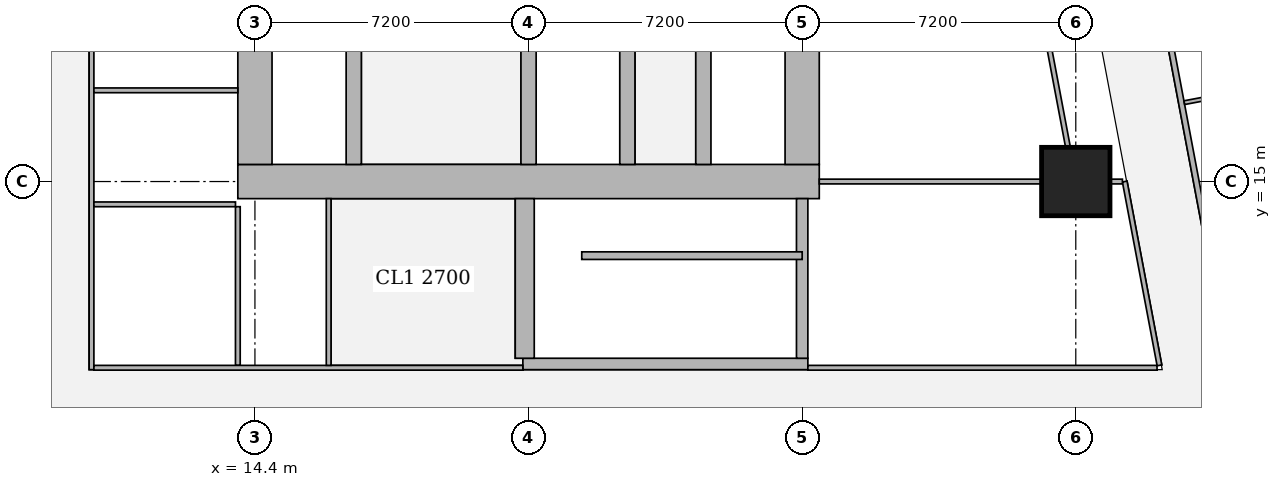
"""IFC4 building model, lengths in metres.
Left out: names, types, materials, properties, quantities, classifications, styles, units other than length and angle.
Written with IfcOpenShell. Run it as: python <this file> out.ifc"""

import sys

from ifc_helpers import new_model, si_unit, direction, frame, frame_2d, origin, origin_2d, place, context, subcontext, project, spatial, rectangle, extrude, element, fill, save


model = new_model("IFC4")
c1 = context("Model", 3, precision=1e-05, world=origin(), true_north=direction((0.0, 1.0)))
c2 = subcontext(c1, "Body", "Model", "MODEL_VIEW")
j1 = project(units=[si_unit("LENGTHUNIT", "METRE"), si_unit("PLANEANGLEUNIT", "RADIAN")], contexts=[c1])
p1 = place(None, origin())
s1 = spatial("IfcSite", under=j1, at=p1, CompositionType="ELEMENT")
p2 = place(p1, origin())
s2 = spatial("IfcBuilding", under=s1, at=p2, CompositionType="ELEMENT")
p3 = place(p2, frame((0.0, 0.0, 53.75)))
s3 = spatial("IfcBuildingStorey", under=s2, at=p3, CompositionType="ELEMENT", Elevation=53.75)
p4 = place(p3, frame((36.0, 15.0, 0.0), z_axis=(0.0, 0.0, 1.0), x_axis=(1.0, 0.0, 0.0)))
e1 = element("IfcColumn", 1, at=p4, inside=s3, PredefinedType="COLUMN", context=c2, shape_type="SweptSolid", body=[
    extrude(rectangle(XDim=1.8, YDim=1.8, at=origin_2d()), origin(), (0.0, 0.0, 1.0), 3.75),
])
p5 = place(p3, frame((13.95, 15.0, 0.0), z_axis=(0.0, 0.0, 1.0), x_axis=(1.0, 0.0, 0.0)))
e2 = element("IfcWall", 2, at=p5, inside=s3, PredefinedType="SHEAR", context=c2, shape_type="SweptSolid", body=[
    extrude(rectangle(XDim=15.3, YDim=0.9, at=frame_2d((7.65, 0.0))), origin(), (0.0, 0.0, 1.0), 3.75),
])
p6 = place(p5, frame((4.45, 0.0, 0.0)))
e3 = element("IfcOpeningElement", 3, at=p6, cuts=e2, PredefinedType="OPENING", context=c2, shape_type="SweptSolid", body=[
    extrude(rectangle(XDim=1.8, YDim=2.1, at=frame_2d((0.9, 1.05))), frame((0.0, 0.46, 0.0), z_axis=(0.0, -1.0, 0.0), x_axis=(1.0, 0.0, 0.0)), (0.0, 0.0, 1.0), 0.92),
])
p7 = place(p5, frame((10.7, 0.0, 0.0)))
e4 = element("IfcOpeningElement", 4, at=p7, cuts=e2, PredefinedType="OPENING", context=c2, shape_type="SweptSolid", body=[
    extrude(rectangle(XDim=1.1, YDim=2.1, at=frame_2d((0.55, 1.05))), frame((0.0, 0.46, 0.0), z_axis=(0.0, -1.0, 0.0), x_axis=(1.0, 0.0, 0.0)), (0.0, 0.0, 1.0), 0.92),
])
for number, where, z_axis, x_axis in (
    (5, (14.4, 15.45, 0.0), (0.0, 0.0, 1.0), (0.0, 1.0, 0.0)),
    (6, (28.8, 15.45, 0.0), (0.0, 0.0, 1.0), (0.0, 1.0, 0.0)),
):
    element("IfcWall", number, at=place(p3, frame(where, z_axis=z_axis, x_axis=x_axis)), inside=s3, PredefinedType="SHEAR", context=c2, shape_type="SweptSolid", body=[
        extrude(rectangle(XDim=14.1, YDim=0.9, at=frame_2d((7.05, 0.0))), origin(), (0.0, 0.0, 1.0), 3.75),
    ])
p8 = place(p3, frame((17.0, 15.45, 0.0), z_axis=(0.0, 0.0, 1.0), x_axis=(0.0, 1.0, 0.0)))
e7 = element("IfcWall", 7, at=p8, inside=s3, PredefinedType="SHEAR", context=c2, shape_type="SweptSolid", body=[
    extrude(rectangle(XDim=14.1, YDim=0.4, at=frame_2d((7.05, 0.0))), origin(), (0.0, 0.0, 1.0), 3.75),
])
p9 = place(p8, frame((0.875, 0.0, 0.0)))
e8 = element("IfcOpeningElement", 8, at=p9, cuts=e7, PredefinedType="OPENING", context=c2, shape_type="SweptSolid", body=[
    extrude(rectangle(XDim=1.1, YDim=2.1, at=frame_2d((0.55, 1.05))), frame((0.0, 0.21, 0.0), z_axis=(0.0, -1.0, 0.0), x_axis=(1.0, 0.0, 0.0)), (0.0, 0.0, 1.0), 0.42),
])
p10 = place(p8, frame((4.625, 0.0, 0.0)))
e9 = element("IfcOpeningElement", 9, at=p10, cuts=e7, PredefinedType="OPENING", context=c2, shape_type="SweptSolid", body=[
    extrude(rectangle(XDim=1.1, YDim=2.1, at=frame_2d((0.55, 1.05))), frame((0.0, 0.21, 0.0), z_axis=(0.0, -1.0, 0.0), x_axis=(1.0, 0.0, 0.0)), (0.0, 0.0, 1.0), 0.42),
])
p11 = place(p8, frame((8.375, 0.0, 0.0)))
e10 = element("IfcOpeningElement", 10, at=p11, cuts=e7, PredefinedType="OPENING", context=c2, shape_type="SweptSolid", body=[
    extrude(rectangle(XDim=1.1, YDim=2.1, at=frame_2d((0.55, 1.05))), frame((0.0, 0.21, 0.0), z_axis=(0.0, -1.0, 0.0), x_axis=(1.0, 0.0, 0.0)), (0.0, 0.0, 1.0), 0.42),
])
p12 = place(p8, frame((12.125, 0.0, 0.0)))
e11 = element("IfcOpeningElement", 11, at=p12, cuts=e7, PredefinedType="OPENING", context=c2, shape_type="SweptSolid", body=[
    extrude(rectangle(XDim=1.1, YDim=2.1, at=frame_2d((0.55, 1.05))), frame((0.0, 0.21, 0.0), z_axis=(0.0, -1.0, 0.0), x_axis=(1.0, 0.0, 0.0)), (0.0, 0.0, 1.0), 0.42),
])
for number, where, z_axis, x_axis in (
    (12, (21.6, 15.45, 0.0), (0.0, 0.0, 1.0), (0.0, 1.0, 0.0)),
    (13, (24.2, 15.45, 0.0), (0.0, 0.0, 1.0), (0.0, 1.0, 0.0)),
):
    element("IfcWall", number, at=place(p3, frame(where, z_axis=z_axis, x_axis=x_axis)), inside=s3, PredefinedType="SHEAR", context=c2, shape_type="SweptSolid", body=[
        extrude(rectangle(XDim=14.1, YDim=0.4, at=frame_2d((7.05, 0.0))), origin(), (0.0, 0.0, 1.0), 3.75),
    ])
p13 = place(p3, frame((26.2, 15.45, 0.0), z_axis=(0.0, 0.0, 1.0), x_axis=(0.0, 1.0, 0.0)))
e14 = element("IfcWall", 14, at=p13, inside=s3, PredefinedType="SHEAR", context=c2, shape_type="SweptSolid", body=[
    extrude(rectangle(XDim=3.1, YDim=0.4, at=frame_2d((1.55, 0.0))), origin(), (0.0, 0.0, 1.0), 3.75),
])
p14 = place(p13, frame((0.825, 0.0, 0.0)))
e15 = element("IfcOpeningElement", 15, at=p14, cuts=e14, PredefinedType="OPENING", context=c2, shape_type="SweptSolid", body=[
    extrude(rectangle(XDim=1.2, YDim=2.1, at=frame_2d((0.6, 1.05))), frame((0.0, 0.21, 0.0), z_axis=(0.0, -1.0, 0.0), x_axis=(1.0, 0.0, 0.0)), (0.0, 0.0, 1.0), 0.42),
])
p15 = place(p3, frame((21.45, 10.2, 0.0), z_axis=(0.0, 0.0, 1.0), x_axis=(1.0, 0.0, 0.0)))
e16 = element("IfcWall", 16, at=p15, inside=s3, PredefinedType="SHEAR", context=c2, shape_type="SweptSolid", body=[
    extrude(rectangle(XDim=7.5, YDim=0.3, at=frame_2d((3.75, 0.0))), origin(), (0.0, 0.0, 1.0), 3.75),
])
p16 = place(p15, frame((0.5, 0.0, 0.0)))
e17 = element("IfcOpeningElement", 17, at=p16, cuts=e16, PredefinedType="OPENING", context=c2, shape_type="SweptSolid", body=[
    extrude(rectangle(XDim=1.1, YDim=2.1, at=frame_2d((0.55, 1.05))), frame((0.0, 0.16, 0.0), z_axis=(0.0, -1.0, 0.0), x_axis=(1.0, 0.0, 0.0)), (0.0, 0.0, 1.0), 0.32),
])
p17 = place(p3, frame((21.5, 10.35, 0.0), z_axis=(0.0, 0.0, 1.0), x_axis=(0.0, 1.0, 0.0)))
e18 = element("IfcWall", 18, at=p17, inside=s3, PredefinedType="SHEAR", context=c2, shape_type="SweptSolid", body=[
    extrude(rectangle(XDim=4.2, YDim=0.5, at=frame_2d((2.1, 0.0))), origin(), (0.0, 0.0, 1.0), 3.75),
])
p18 = place(p3, frame((28.8, 10.35, 0.0), z_axis=(0.0, 0.0, 1.0), x_axis=(0.0, 1.0, 0.0)))
e19 = element("IfcWall", 19, at=p18, inside=s3, PredefinedType="SHEAR", context=c2, shape_type="SweptSolid", body=[
    extrude(rectangle(XDim=4.2, YDim=0.3, at=frame_2d((2.1, 0.0))), origin(), (0.0, 0.0, 1.0), 3.75),
])
p19 = place(p3, frame((35.094, 36.585, 0.0), z_axis=(0.0, 0.0, 1.0), x_axis=(0.185588860311, -0.982627485331, 0.0)))
e20 = element("IfcWall", 20, at=p19, inside=s3, PredefinedType="SOLIDWALL", context=c2, shape_type="SweptSolid", body=[
    extrude(rectangle(XDim=34.797, YDim=0.15, at=frame_2d((17.399, 0.0))), origin(), (0.0, 0.0, 1.0), 2.5),
])
p20 = place(p19, frame((9.828, 0.0, 0.0)))
e21 = element("IfcOpeningElement", 21, at=p20, cuts=e20, PredefinedType="OPENING", context=c2, shape_type="SweptSolid", body=[
    extrude(rectangle(XDim=1.0, YDim=2.1, at=frame_2d((0.5, 1.05))), frame((0.0, 0.085, 0.0), z_axis=(0.0, -1.0, 0.0), x_axis=(1.0, 0.0, 0.0)), (0.0, 0.0, 1.0), 0.17),
])
p21 = place(p19, frame((13.645, 0.0, 0.0)))
e22 = element("IfcOpeningElement", 22, at=p21, cuts=e20, PredefinedType="OPENING", context=c2, shape_type="SweptSolid", body=[
    extrude(rectangle(XDim=1.0, YDim=2.1, at=frame_2d((0.5, 1.05))), frame((0.0, 0.085, 0.0), z_axis=(0.0, -1.0, 0.0), x_axis=(1.0, 0.0, 0.0)), (0.0, 0.0, 1.0), 0.17),
])
p22 = place(p19, frame((25.9, 0.0, 0.0)))
e23 = element("IfcOpeningElement", 23, at=p22, cuts=e20, PredefinedType="OPENING", context=c2, shape_type="SweptSolid", body=[
    extrude(rectangle(XDim=1.0, YDim=2.1, at=frame_2d((0.5, 1.05))), frame((0.0, 0.085, 0.0), z_axis=(0.0, -1.0, 0.0), x_axis=(1.0, 0.0, 0.0)), (0.0, 0.0, 1.0), 0.17),
])
p23 = place(p3, frame((42.073, 17.683, 0.0), z_axis=(0.0, 0.0, 1.0), x_axis=(-0.982607026909, -0.185697147715, 0.0)))
e24 = element("IfcWall", 24, at=p23, inside=s3, PredefinedType="PARTITIONING", context=c2, shape_type="SweptSolid", body=[
    extrude(rectangle(XDim=3.275, YDim=0.1, at=frame_2d((1.637, 0.0))), origin(), (0.0, 0.0, 1.0), 3.5),
])
p24 = place(p3, frame((10.1, 10.05, 0.0), z_axis=(0.0, 0.0, 1.0), x_axis=(0.0, 1.0, 0.0)))
e25 = element("IfcWall", 25, at=p24, inside=s3, PredefinedType="PARTITIONING", context=c2, shape_type="SweptSolid", body=[
    extrude(rectangle(XDim=24.9, YDim=0.125, at=frame_2d((12.45, 0.0))), origin(), (0.0, 0.0, 1.0), 3.5),
])
p25 = place(p24, frame((1.675, 0.0, 0.0)))
e26 = element("IfcOpeningElement", 26, at=p25, cuts=e25, PredefinedType="OPENING", context=c2, shape_type="SweptSolid", body=[
    extrude(rectangle(XDim=1.0, YDim=2.1, at=frame_2d((0.5, 1.05))), frame((0.0, 0.073, 0.0), z_axis=(0.0, -1.0, 0.0), x_axis=(1.0, 0.0, 0.0)), (0.0, 0.0, 1.0), 0.145),
])
p26 = place(p24, frame((5.35, 0.0, 0.0)))
e27 = element("IfcOpeningElement", 27, at=p26, cuts=e25, PredefinedType="OPENING", context=c2, shape_type="SweptSolid", body=[
    extrude(rectangle(XDim=1.0, YDim=2.1, at=frame_2d((0.5, 1.05))), frame((0.0, 0.073, 0.0), z_axis=(0.0, -1.0, 0.0), x_axis=(1.0, 0.0, 0.0)), (0.0, 0.0, 1.0), 0.145),
])
p27 = place(p24, frame((11.05, 0.0, 0.0)))
e28 = element("IfcOpeningElement", 28, at=p27, cuts=e25, PredefinedType="OPENING", context=c2, shape_type="SweptSolid", body=[
    extrude(rectangle(XDim=1.0, YDim=2.1, at=frame_2d((0.5, 1.05))), frame((0.0, 0.073, 0.0), z_axis=(0.0, -1.0, 0.0), x_axis=(1.0, 0.0, 0.0)), (0.0, 0.0, 1.0), 0.145),
])
p28 = place(p24, frame((18.35, 0.0, 0.0)))
e29 = element("IfcOpeningElement", 29, at=p28, cuts=e25, PredefinedType="OPENING", context=c2, shape_type="SweptSolid", body=[
    extrude(rectangle(XDim=1.0, YDim=2.1, at=frame_2d((0.5, 1.05))), frame((0.0, 0.073, 0.0), z_axis=(0.0, -1.0, 0.0), x_axis=(1.0, 0.0, 0.0)), (0.0, 0.0, 1.0), 0.145),
])
p29 = place(p24, frame((22.925, 0.0, 0.0)))
e30 = element("IfcOpeningElement", 30, at=p29, cuts=e25, PredefinedType="OPENING", context=c2, shape_type="SweptSolid", body=[
    extrude(rectangle(XDim=1.0, YDim=2.1, at=frame_2d((0.5, 1.05))), frame((0.0, 0.073, 0.0), z_axis=(0.0, -1.0, 0.0), x_axis=(1.0, 0.0, 0.0)), (0.0, 0.0, 1.0), 0.145),
])
p30 = place(p3, frame((10.163, 14.4, 0.0), z_axis=(0.0, 0.0, 1.0), x_axis=(1.0, 0.0, 0.0)))
e31 = element("IfcWall", 31, at=p30, inside=s3, PredefinedType="PARTITIONING", context=c2, shape_type="SweptSolid", body=[
    extrude(rectangle(XDim=3.725, YDim=0.125, at=frame_2d((1.862, 0.0))), origin(), (0.0, 0.0, 1.0), 3.5),
])
p31 = place(p3, frame((10.163, 17.4, 0.0), z_axis=(0.0, 0.0, 1.0), x_axis=(1.0, 0.0, 0.0)))
e32 = element("IfcWall", 32, at=p31, inside=s3, PredefinedType="PARTITIONING", context=c2, shape_type="SweptSolid", body=[
    extrude(rectangle(XDim=3.787, YDim=0.125, at=frame_2d((1.894, 0.0))), origin(), (0.0, 0.0, 1.0), 3.5),
])
p32 = place(p3, frame((13.95, 10.163, 0.0), z_axis=(0.0, 0.0, 1.0), x_axis=(0.0, 1.0, 0.0)))
e33 = element("IfcWall", 33, at=p32, inside=s3, PredefinedType="PARTITIONING", context=c2, shape_type="SweptSolid", body=[
    extrude(rectangle(XDim=4.175, YDim=0.125, at=frame_2d((2.087, 0.0))), origin(), (0.0, 0.0, 1.0), 3.5),
])
p33 = place(p3, frame((10.163, 10.1, 0.0), z_axis=(0.0, 0.0, 1.0), x_axis=(1.0, 0.0, 0.0)))
e34 = element("IfcWall", 34, at=p33, inside=s3, PredefinedType="PARTITIONING", context=c2, shape_type="SweptSolid", body=[
    extrude(rectangle(XDim=11.287, YDim=0.125, at=frame_2d((5.644, 0.0))), origin(), (0.0, 0.0, 1.0), 3.5),
])
p34 = place(p33, frame((7.832, 0.0, 0.0)))
e35 = element("IfcOpeningElement", 35, at=p34, cuts=e34, PredefinedType="OPENING", context=c2, shape_type="SweptSolid", body=[
    extrude(rectangle(XDim=1.8, YDim=2.1, at=frame_2d((0.9, 1.05))), frame((0.0, 0.073, 0.0), z_axis=(0.0, -1.0, 0.0), x_axis=(1.0, 0.0, 0.0)), (0.0, 0.0, 1.0), 0.145),
])
p35 = place(p3, frame((16.34, 10.163, 0.0), z_axis=(0.0, 0.0, 1.0), x_axis=(0.0, 1.0, 0.0)))
e36 = element("IfcWall", 36, at=p35, inside=s3, PredefinedType="PARTITIONING", context=c2, shape_type="SweptSolid", body=[
    extrude(rectangle(XDim=4.387, YDim=0.125, at=frame_2d((2.193, 0.0))), origin(), (0.0, 0.0, 1.0), 3.5),
])
p36 = place(p35, frame((1.637, 0.0, 0.0)))
e37 = element("IfcOpeningElement", 37, at=p36, cuts=e36, PredefinedType="OPENING", context=c2, shape_type="SweptSolid", body=[
    extrude(rectangle(XDim=1.0, YDim=2.1, at=frame_2d((0.5, 1.05))), frame((0.0, 0.073, 0.0), z_axis=(0.0, -1.0, 0.0), x_axis=(1.0, 0.0, 0.0)), (0.0, 0.0, 1.0), 0.145),
])
p37 = place(p3, frame((28.95, 10.1, 0.0), z_axis=(0.0, 0.0, 1.0), x_axis=(1.0, 0.0, 0.0)))
e38 = element("IfcWall", 38, at=p37, inside=s3, PredefinedType="PARTITIONING", context=c2, shape_type="SweptSolid", body=[
    extrude(rectangle(XDim=9.188, YDim=0.125, at=frame_2d((4.594, 0.0))), origin(), (0.0, 0.0, 1.0), 3.5),
])
p38 = place(p3, frame((38.202, 10.163, 0.0), z_axis=(0.0, 0.0, 1.0), x_axis=(-0.185641892853, 0.982617467593, 0.0)))
e39 = element("IfcWall", 39, at=p38, inside=s3, PredefinedType="PARTITIONING", context=c2, shape_type="SweptSolid", body=[
    extrude(rectangle(XDim=4.922, YDim=0.125, at=frame_2d((2.461, 0.0))), origin(), (0.0, 0.0, 1.0), 3.5),
])
p39 = place(p38, frame((0.708, 0.0, 0.0)))
e40 = element("IfcOpeningElement", 40, at=p39, cuts=e39, PredefinedType="OPENING", context=c2, shape_type="SweptSolid", body=[
    extrude(rectangle(XDim=1.0, YDim=2.1, at=frame_2d((0.5, 1.05))), frame((0.0, 0.073, 0.0), z_axis=(0.0, -1.0, 0.0), x_axis=(1.0, 0.0, 0.0)), (0.0, 0.0, 1.0), 0.145),
])
p40 = place(p3, frame((35.793, 15.913, 0.0), z_axis=(0.0, 0.0, 1.0), x_axis=(-0.185651708232, 0.982615613162, 0.0)))
e41 = element("IfcWall", 41, at=p40, inside=s3, PredefinedType="PARTITIONING", context=c2, shape_type="SweptSolid", body=[
    extrude(rectangle(XDim=13.407, YDim=0.125, at=frame_2d((6.704, 0.0))), origin(), (0.0, 0.0, 1.0), 2.5),
])
p41 = place(p40, frame((4.9, 0.0, 0.0)))
e42 = element("IfcOpeningElement", 42, at=p41, cuts=e41, PredefinedType="OPENING", context=c2, shape_type="SweptSolid", body=[
    extrude(rectangle(XDim=1.0, YDim=2.1, at=frame_2d((0.5, 1.05))), frame((0.0, 0.073, 0.0), z_axis=(0.0, -1.0, 0.0), x_axis=(1.0, 0.0, 0.0)), (0.0, 0.0, 1.0), 0.145),
])
p42 = place(p3, frame((29.25, 15.0, 0.0), z_axis=(0.0, 0.0, 1.0), x_axis=(1.0, 0.0, 0.0)))
e43 = element("IfcWall", 43, at=p42, inside=s3, PredefinedType="PARTITIONING", context=c2, shape_type="SweptSolid", body=[
    extrude(rectangle(XDim=5.849, YDim=0.125, at=frame_2d((2.925, 0.0))), origin(), (0.0, 0.0, 1.0), 3.5),
])
p43 = place(p3, frame((36.901, 15.0, 0.0), z_axis=(0.0, 0.0, 1.0), x_axis=(1.0, 0.0, 0.0)))
e44 = element("IfcWall", 44, at=p43, inside=s3, PredefinedType="PARTITIONING", context=c2, shape_type="SweptSolid", body=[
    extrude(rectangle(XDim=0.326, YDim=0.125, at=frame_2d((0.163, 0.0))), origin(), (0.0, 0.0, 1.0), 3.5),
])
p44 = place(p3, frame((23.0, 13.05, 0.0), z_axis=(0.0, 0.0, 1.0), x_axis=(1.0, 0.0, 0.0)))
e45 = element("IfcWall", 45, at=p44, inside=s3, PredefinedType="SHEAR", context=c2, shape_type="SweptSolid", body=[
    extrude(rectangle(XDim=5.8, YDim=0.2, at=frame_2d((2.9, 0.0))), origin(), (0.0, 0.0, 1.0), 3.75),
])
p45 = place(p25, origin())
e46 = element("IfcDoor", 46, at=p45, inside=s3, OperationType="SINGLE_SWING_RIGHT", PredefinedType="DOOR", context=c2, shape_type="SweptSolid", body=[
    extrude(rectangle(XDim=1.0, YDim=2.1, at=frame_2d((0.5, 1.05))), frame((0.0, 0.025, 0.0), z_axis=(0.0, -1.0, 0.0), x_axis=(1.0, 0.0, 0.0)), (0.0, 0.0, 1.0), 0.05),
])
fill(e26, e46)
p46 = place(p26, origin())
e47 = element("IfcDoor", 47, at=p46, inside=s3, OperationType="SINGLE_SWING_LEFT", PredefinedType="DOOR", context=c2, shape_type="SweptSolid", body=[
    extrude(rectangle(XDim=1.0, YDim=2.1, at=frame_2d((0.5, 1.05))), frame((0.0, 0.025, 0.0), z_axis=(0.0, -1.0, 0.0), x_axis=(1.0, 0.0, 0.0)), (0.0, 0.0, 1.0), 0.05),
])
fill(e27, e47)
p47 = place(p36, origin())
e48 = element("IfcDoor", 48, at=p47, inside=s3, OperationType="SINGLE_SWING_LEFT", PredefinedType="DOOR", context=c2, shape_type="SweptSolid", body=[
    extrude(rectangle(XDim=1.0, YDim=2.1, at=frame_2d((0.5, 1.05))), frame((0.0, 0.025, 0.0), z_axis=(0.0, -1.0, 0.0), x_axis=(1.0, 0.0, 0.0)), (0.0, 0.0, 1.0), 0.05),
])
fill(e37, e48)
p48 = place(p34, origin())
e49 = element("IfcDoor", 49, at=p48, inside=s3, OperationType="DOUBLE_DOOR_SINGLE_SWING", PredefinedType="DOOR", context=c2, shape_type="SweptSolid", body=[
    extrude(rectangle(XDim=1.8, YDim=2.1, at=frame_2d((0.9, 1.05))), frame((0.0, 0.025, 0.0), z_axis=(0.0, -1.0, 0.0), x_axis=(1.0, 0.0, 0.0)), (0.0, 0.0, 1.0), 0.05),
])
fill(e35, e49)
p49 = place(p39, origin())
e50 = element("IfcDoor", 50, at=p49, inside=s3, OperationType="SINGLE_SWING_LEFT", PredefinedType="DOOR", context=c2, shape_type="SweptSolid", body=[
    extrude(rectangle(XDim=1.0, YDim=2.1, at=frame_2d((0.5, 1.05))), frame((0.0, 0.025, 0.0), z_axis=(0.0, -1.0, 0.0), x_axis=(1.0, 0.0, 0.0)), (0.0, 0.0, 1.0), 0.05),
])
fill(e40, e50)
p50 = place(p6, origin())
e51 = element("IfcDoor", 51, at=p50, inside=s3, OperationType="DOUBLE_DOOR_SINGLE_SWING", PredefinedType="DOOR", context=c2, shape_type="SweptSolid", body=[
    extrude(rectangle(XDim=1.8, YDim=2.1, at=frame_2d((0.9, 1.05))), frame((0.0, 0.025, 0.0), z_axis=(0.0, -1.0, 0.0), x_axis=(1.0, 0.0, 0.0)), (0.0, 0.0, 1.0), 0.05),
])
fill(e3, e51)
p51 = place(p7, origin())
e52 = element("IfcDoor", 52, at=p51, inside=s3, OperationType="SINGLE_SWING_LEFT", PredefinedType="DOOR", context=c2, shape_type="SweptSolid", body=[
    extrude(rectangle(XDim=1.1, YDim=2.1, at=frame_2d((0.55, 1.05))), frame((0.0, 0.025, 0.0), z_axis=(0.0, -1.0, 0.0), x_axis=(1.0, 0.0, 0.0)), (0.0, 0.0, 1.0), 0.05),
])
fill(e4, e52)
p52 = place(p14, origin())
e53 = element("IfcDoor", 53, at=p52, inside=s3, OperationType="DOUBLE_DOOR_SLIDING", PredefinedType="DOOR", context=c2, shape_type="SweptSolid", body=[
    extrude(rectangle(XDim=1.2, YDim=2.1, at=frame_2d((0.6, 1.05))), frame((0.0, 0.025, 0.0), z_axis=(0.0, -1.0, 0.0), x_axis=(1.0, 0.0, 0.0)), (0.0, 0.0, 1.0), 0.05),
])
fill(e15, e53)
p53 = place(p9, origin())
e54 = element("IfcDoor", 54, at=p53, inside=s3, OperationType="DOUBLE_DOOR_SLIDING", PredefinedType="DOOR", context=c2, shape_type="SweptSolid", body=[
    extrude(rectangle(XDim=1.1, YDim=2.1, at=frame_2d((0.55, 1.05))), frame((0.0, 0.025, 0.0), z_axis=(0.0, -1.0, 0.0), x_axis=(1.0, 0.0, 0.0)), (0.0, 0.0, 1.0), 0.05),
])
fill(e8, e54)
p54 = place(p16, origin())
e55 = element("IfcDoor", 55, at=p54, inside=s3, OperationType="SINGLE_SWING_LEFT", PredefinedType="DOOR", context=c2, shape_type="SweptSolid", body=[
    extrude(rectangle(XDim=1.1, YDim=2.1, at=frame_2d((0.55, 1.05))), frame((0.0, 0.025, 0.0), z_axis=(0.0, -1.0, 0.0), x_axis=(1.0, 0.0, 0.0)), (0.0, 0.0, 1.0), 0.05),
])
fill(e17, e55)
save(model, sys.argv[1])
